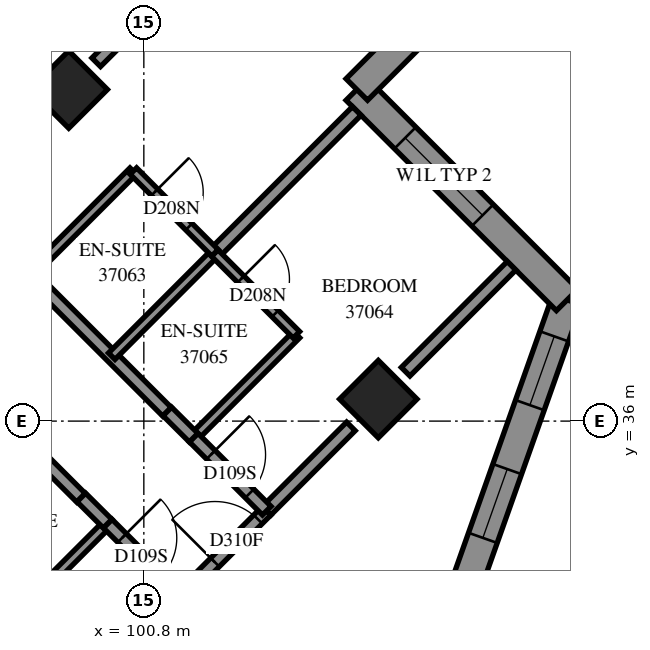
"""IFC4 building model, lengths in metres.
Left out: names, types, materials, properties, quantities, classifications, styles, units other than length and angle.
Written with IfcOpenShell. Run it as: python <this file> out.ifc"""

import sys

from ifc_helpers import new_model, si_unit, direction, frame, frame_2d, origin, origin_2d, place, context, subcontext, project, spatial, polyline, rectangle, outline, extrude, element, fill, save


model = new_model("IFC4")
c1 = context("Model", 3, precision=1e-05, world=origin(), true_north=direction((0.0, 1.0)))
c2 = subcontext(c1, "Body", "Model", "MODEL_VIEW")
j1 = project(units=[si_unit("LENGTHUNIT", "METRE"), si_unit("PLANEANGLEUNIT", "RADIAN")], contexts=[c1])
p1 = place(None, origin())
s1 = spatial("IfcSite", under=j1, at=p1, CompositionType="ELEMENT")
p2 = place(p1, origin())
s2 = spatial("IfcBuilding", under=s1, at=p2, CompositionType="ELEMENT")
p3 = place(p2, frame((0.0, 0.0, 138.8)))
s3 = spatial("IfcBuildingStorey", under=s2, at=p3, CompositionType="ELEMENT", Elevation=138.8)
for number, where, z_axis, x_axis in (
    (1, (99.565, 41.453, 0.0), (0.0, 0.0, 1.0), (0.707, -0.707, 0.0)),
    (2, (104.656, 36.362, 0.0), (0.0, 0.0, 1.0), (0.707, -0.707, 0.0)),
):
    element("IfcColumn", number, at=place(p3, frame(where, z_axis=z_axis, x_axis=x_axis)), inside=s3, PredefinedType="COLUMN", context=c2, shape_type="SweptSolid", body=[
        extrude(rectangle(XDim=0.9, YDim=0.9, at=origin_2d()), origin(), (0.0, 0.0, 1.0), 3.1),
    ])
p4 = place(p3, frame((105.991, 32.994, 0.0), z_axis=(0.0, 0.0, 1.0), x_axis=(0.333866339, 0.9426204261, 0.0)))
e3 = element("IfcWall", 3, at=p4, inside=s3, PredefinedType="SOLIDWALL", context=c2, shape_type="SweptSolid", body=[
    extrude(outline(polyline([(-0.114, -0.25), (5.461, -0.25), (5.146, 0.25), (0.114, 0.25), (-0.114, -0.25)])), origin(), (0.0, 0.0, 1.0), 3.1),
])
p5 = place(p4, frame((1.151, 0.0, 0.45)))
e4 = element("IfcOpeningElement", 4, at=p5, cuts=e3, PredefinedType="OPENING", context=c2, shape_type="SweptSolid", body=[
    extrude(rectangle(XDim=1.2, YDim=2.5, at=frame_2d((0.6, 1.25))), frame((0.0, 0.26, 0.0), z_axis=(0.0, -1.0, 0.0), x_axis=(1.0, 0.0, 0.0)), (0.0, 0.0, 1.0), 0.52),
])
p6 = place(p4, frame((3.467, 0.0, 0.45)))
e5 = element("IfcOpeningElement", 5, at=p6, cuts=e3, PredefinedType="OPENING", context=c2, shape_type="SweptSolid", body=[
    extrude(rectangle(XDim=1.2, YDim=2.5, at=frame_2d((0.6, 1.25))), frame((0.0, 0.26, 0.0), z_axis=(0.0, -1.0, 0.0), x_axis=(1.0, 0.0, 0.0)), (0.0, 0.0, 1.0), 0.52),
])
p7 = place(p3, frame((107.762, 37.994, 0.0), z_axis=(0.0, 0.0, 1.0), x_axis=(-0.707127221, 0.7070863407, 0.0)))
e6 = element("IfcWall", 6, at=p7, inside=s3, PredefinedType="SOLIDWALL", context=c2, shape_type="SweptSolid", body=[
    extrude(outline(polyline([(-0.158, -0.25), (4.642, -0.25), (5.142, 0.25), (0.158, 0.25), (-0.158, -0.25)])), origin(), (0.0, 0.0, 1.0), 3.1),
])
p8 = place(p7, frame((1.967, 0.0, 0.6)))
e7 = element("IfcOpeningElement", 7, at=p8, cuts=e6, PredefinedType="OPENING", context=c2, shape_type="SweptSolid", body=[
    extrude(rectangle(XDim=1.8, YDim=1.9, at=frame_2d((0.9, 0.95))), frame((0.0, 0.26, 0.0), z_axis=(0.0, -1.0, 0.0), x_axis=(1.0, 0.0, 0.0)), (0.0, 0.0, 1.0), 0.52),
])
p9 = place(p3, frame((104.302, 41.453, 0.0), z_axis=(0.0, 0.0, 1.0), x_axis=(0.7071156278, 0.7070979344, 0.0)))
e8 = element("IfcWall", 8, at=p9, inside=s3, PredefinedType="SOLIDWALL", context=c2, shape_type="SweptSolid", body=[
    extrude(outline(polyline([(0.25, -0.25), (5.98, -0.25), (5.324, 0.25), (-0.25, 0.25), (0.25, -0.25)])), origin(), (0.0, 0.0, 1.0), 3.1),
])
p10 = place(p9, frame((1.125, 0.0, 0.6)))
e9 = element("IfcOpeningElement", 9, at=p10, cuts=e8, PredefinedType="OPENING", context=c2, shape_type="SweptSolid", body=[
    extrude(rectangle(XDim=1.8, YDim=1.9, at=frame_2d((0.9, 0.95))), frame((0.0, 0.26, 0.0), z_axis=(0.0, -1.0, 0.0), x_axis=(1.0, 0.0, 0.0)), (0.0, 0.0, 1.0), 0.52),
])
p11 = place(p3, frame((93.127, 41.379, 0.0), z_axis=(0.0, 0.0, 1.0), x_axis=(0.7071067812, -0.7071067812, 0.0)))
e10 = element("IfcWall", 10, at=p11, inside=s3, PredefinedType="PARTITIONING", context=c2, shape_type="SweptSolid", body=[
    extrude(rectangle(XDim=9.39, YDim=0.2, at=frame_2d((4.695, 0.0))), origin(), (0.0, 0.0, 1.0), 3.1),
])
p12 = place(p11, frame((3.2, 0.0, 0.0)))
e11 = element("IfcOpeningElement", 11, at=p12, cuts=e10, PredefinedType="OPENING", context=c2, shape_type="SweptSolid", body=[
    extrude(rectangle(XDim=0.9, YDim=2.1, at=frame_2d((0.45, 1.05))), frame((0.0, 0.11, 0.0), z_axis=(0.0, -1.0, 0.0), x_axis=(1.0, 0.0, 0.0)), (0.0, 0.0, 1.0), 0.22),
])
p13 = place(p3, frame((95.177, 42.157, 0.0), z_axis=(0.0, 0.0, 1.0), x_axis=(0.7071067812, -0.7071067812, 0.0)))
e12 = element("IfcWall", 12, at=p13, inside=s3, PredefinedType="PARTITIONING", context=c2, shape_type="SweptSolid", body=[
    extrude(rectangle(XDim=8.491, YDim=0.2, at=frame_2d((4.245, 0.0))), origin(), (0.0, 0.0, 1.0), 3.1),
])
p14 = place(p13, frame((2.3, 0.0, 0.0)))
e13 = element("IfcOpeningElement", 13, at=p14, cuts=e12, PredefinedType="OPENING", context=c2, shape_type="SweptSolid", body=[
    extrude(rectangle(XDim=0.9, YDim=2.1, at=frame_2d((0.45, 1.05))), frame((0.0, 0.11, 0.0), z_axis=(0.0, -1.0, 0.0), x_axis=(1.0, 0.0, 0.0)), (0.0, 0.0, 1.0), 0.22),
])
p15 = place(p13, frame((3.95, 0.0, 0.0)))
e14 = element("IfcOpeningElement", 14, at=p15, cuts=e12, PredefinedType="OPENING", context=c2, shape_type="SweptSolid", body=[
    extrude(rectangle(XDim=0.9, YDim=2.1, at=frame_2d((0.45, 1.05))), frame((0.0, 0.11, 0.0), z_axis=(0.0, -1.0, 0.0), x_axis=(1.0, 0.0, 0.0)), (0.0, 0.0, 1.0), 0.22),
])
p16 = place(p3, frame((100.017, 41.901, 0.0), z_axis=(0.0, 0.0, 1.0), x_axis=(0.7072754814, 0.7069380408, 0.0)))
e15 = element("IfcWall", 15, at=p16, inside=s3, PredefinedType="PARTITIONING", context=c2, shape_type="SweptSolid", body=[
    extrude(rectangle(XDim=5.927, YDim=0.2, at=frame_2d((2.963, 0.0))), origin(), (0.0, 0.0, 1.0), 3.1),
])
p17 = place(p3, frame((101.968, 38.766, 0.0), z_axis=(0.0, 0.0, 1.0), x_axis=(0.7071067812, 0.7071067812, 0.0)))
e16 = element("IfcWall", 16, at=p17, inside=s3, PredefinedType="PARTITIONING", context=c2, shape_type="SweptSolid", body=[
    extrude(rectangle(XDim=3.3, YDim=0.2, at=frame_2d((1.65, 0.0))), origin(), (0.0, 0.0, 1.0), 3.1),
])
p18 = place(p3, frame((105.105, 36.813, 0.0), z_axis=(0.0, 0.0, 1.0), x_axis=(0.7071067812, 0.7071067812, 0.0)))
e17 = element("IfcWall", 17, at=p18, inside=s3, PredefinedType="PARTITIONING", context=c2, shape_type="SweptSolid", body=[
    extrude(rectangle(XDim=2.463, YDim=0.2, at=frame_2d((1.232, 0.0))), origin(), (0.0, 0.0, 1.0), 3.1),
])
for number, where, z_axis, x_axis in (
    (18, (98.927, 38.413, 0.0), (0.0, 0.0, 1.0), (0.707, 0.707, 0.0)),
    (19, (98.503, 32.615, 0.0), (0.0, 0.0, 1.0), (0.707, 0.707, 0.0)),
):
    element("IfcWall", number, at=place(p3, frame(where, z_axis=z_axis, x_axis=x_axis)), inside=s3, PredefinedType="PARTITIONING", context=c2, shape_type="SweptSolid", body=[
        extrude(rectangle(XDim=2.401, YDim=0.15, at=frame_2d((1.201, 0.0))), origin(), (0.0, 0.0, 1.0), 3.1),
    ])
p19 = place(p3, frame((100.273, 37.067, 0.0), z_axis=(0.0, 0.0, 1.0), x_axis=(0.706689978, 0.7075233388, 0.0)))
e20 = element("IfcWall", 20, at=p19, inside=s3, PredefinedType="PARTITIONING", context=c2, shape_type="SweptSolid", body=[
    extrude(rectangle(XDim=2.4, YDim=0.15, at=frame_2d((1.2, 0.0))), origin(), (0.0, 0.0, 1.0), 3.1),
])
p20 = place(p3, frame((101.615, 35.727, 0.0), z_axis=(0.0, 0.0, 1.0), x_axis=(0.7071067812, 0.7071067812, 0.0)))
e21 = element("IfcWall", 21, at=p20, inside=s3, PredefinedType="PARTITIONING", context=c2, shape_type="SweptSolid", body=[
    extrude(rectangle(XDim=2.398, YDim=0.15, at=frame_2d((1.199, 0.0))), origin(), (0.0, 0.0, 1.0), 3.1),
])
p21 = place(p3, frame((101.403, 33.111, 0.0), z_axis=(0.0, 0.0, 1.0), x_axis=(0.7071067812, 0.7071067812, 0.0)))
e22 = element("IfcWall", 22, at=p21, inside=s3, PredefinedType="PARTITIONING", context=c2, shape_type="SweptSolid", body=[
    extrude(rectangle(XDim=2.0, YDim=0.2, at=frame_2d((1.0, 0.0))), origin(), (0.0, 0.0, 1.0), 2.6),
])
p22 = place(p21, frame((0.802, 0.0, 0.0)))
e23 = element("IfcOpeningElement", 23, at=p22, cuts=e22, PredefinedType="OPENING", context=c2, shape_type="SweptSolid", body=[
    extrude(rectangle(XDim=1.0, YDim=2.1, at=frame_2d((0.5, 1.05))), frame((0.0, 0.11, 0.0), z_axis=(0.0, -1.0, 0.0), x_axis=(1.0, 0.0, 0.0)), (0.0, 0.0, 1.0), 0.22),
])
p23 = place(p3, frame((102.817, 34.525, 0.0), z_axis=(0.0, 0.0, 1.0), x_axis=(0.7071067812, 0.7071067812, 0.0)))
e24 = element("IfcWall", 24, at=p23, inside=s3, PredefinedType="PARTITIONING", context=c2, shape_type="SweptSolid", body=[
    extrude(rectangle(XDim=1.963, YDim=0.2, at=frame_2d((0.982, 0.0))), origin(), (0.0, 0.0, 1.0), 2.6),
])
p24 = place(p3, frame((101.965, 38.763, 0.0), z_axis=(0.0, 0.0, 1.0), x_axis=(0.7071067812, -0.7071067812, 0.0)))
e25 = element("IfcWall", 25, at=p24, inside=s3, PredefinedType="PARTITIONING", context=c2, shape_type="SweptSolid", body=[
    extrude(rectangle(XDim=1.901, YDim=0.15, at=frame_2d((0.95, 0.0))), origin(), (0.0, 0.0, 1.0), 3.1),
])
p25 = place(p24, frame((0.608, 0.0, 0.0)))
e26 = element("IfcOpeningElement", 26, at=p25, cuts=e25, PredefinedType="OPENING", context=c2, shape_type="SweptSolid", body=[
    extrude(rectangle(XDim=0.8, YDim=2.1, at=frame_2d((0.4, 1.05))), frame((0.0, 0.085, 0.0), z_axis=(0.0, -1.0, 0.0), x_axis=(1.0, 0.0, 0.0)), (0.0, 0.0, 1.0), 0.17),
])
p26 = place(p3, frame((100.628, 40.112, 0.0), z_axis=(0.0, 0.0, 1.0), x_axis=(0.7065800724, -0.7076330979, 0.0)))
e27 = element("IfcWall", 27, at=p26, inside=s3, PredefinedType="PARTITIONING", context=c2, shape_type="SweptSolid", body=[
    extrude(rectangle(XDim=1.899, YDim=0.15, at=frame_2d((0.95, 0.0))), origin(), (0.0, 0.0, 1.0), 3.1),
])
p27 = place(p26, frame((0.493, 0.0, 0.0)))
e28 = element("IfcOpeningElement", 28, at=p27, cuts=e27, PredefinedType="OPENING", context=c2, shape_type="SweptSolid", body=[
    extrude(rectangle(XDim=0.8, YDim=2.1, at=frame_2d((0.4, 1.05))), frame((0.0, 0.085, 0.0), z_axis=(0.0, -1.0, 0.0), x_axis=(1.0, 0.0, 0.0)), (0.0, 0.0, 1.0), 0.17),
])
p28 = place(p3, frame((100.205, 34.315, 0.0), z_axis=(0.0, 0.0, 1.0), x_axis=(0.7071067812, -0.7071067812, 0.0)))
e29 = element("IfcWall", 29, at=p28, inside=s3, PredefinedType="PARTITIONING", context=c2, shape_type="SweptSolid", body=[
    extrude(rectangle(XDim=1.7, YDim=0.2, at=frame_2d((0.85, 0.0))), origin(), (0.0, 0.0, 1.0), 3.1),
])
p29 = place(p28, frame((0.335, 0.0, 0.0)))
e30 = element("IfcOpeningElement", 30, at=p29, cuts=e29, PredefinedType="OPENING", context=c2, shape_type="SweptSolid", body=[
    extrude(rectangle(XDim=0.9, YDim=2.1, at=frame_2d((0.45, 1.05))), frame((0.0, 0.11, 0.0), z_axis=(0.0, -1.0, 0.0), x_axis=(1.0, 0.0, 0.0)), (0.0, 0.0, 1.0), 0.22),
])
p30 = place(p3, frame((101.619, 35.729, 0.0), z_axis=(0.0, 0.0, 1.0), x_axis=(0.7071067812, -0.7071067812, 0.0)))
e31 = element("IfcWall", 31, at=p30, inside=s3, PredefinedType="PARTITIONING", context=c2, shape_type="SweptSolid", body=[
    extrude(rectangle(XDim=1.7, YDim=0.2, at=frame_2d((0.85, 0.0))), origin(), (0.0, 0.0, 1.0), 3.1),
])
p31 = place(p30, frame((0.4, 0.0, 0.0)))
e32 = element("IfcOpeningElement", 32, at=p31, cuts=e31, PredefinedType="OPENING", context=c2, shape_type="SweptSolid", body=[
    extrude(rectangle(XDim=0.9, YDim=2.1, at=frame_2d((0.45, 1.05))), frame((0.0, 0.11, 0.0), z_axis=(0.0, -1.0, 0.0), x_axis=(1.0, 0.0, 0.0)), (0.0, 0.0, 1.0), 0.22),
])
for number, where, z_axis, x_axis in (
    (33, (101.186, 36.158, 0.0), (0.0, 0.0, 1.0), (0.709, -0.705, 0.0)),
    (34, (99.772, 34.744, 0.0), (0.0, 0.0, 1.0), (0.709, -0.705, 0.0)),
):
    element("IfcWall", number, at=place(p3, frame(where, z_axis=z_axis, x_axis=x_axis)), inside=s3, PredefinedType="PARTITIONING", context=c2, shape_type="SweptSolid", body=[
        extrude(rectangle(XDim=0.61, YDim=0.2, at=frame_2d((0.305, 0.0))), origin(), (0.0, 0.0, 1.0), 3.1),
    ])
p32 = place(p5, origin())
e35 = element("IfcWindow", 35, at=p32, inside=s3, PartitioningType="SINGLE_PANEL", PredefinedType="WINDOW", context=c2, shape_type="SweptSolid", body=[
    extrude(rectangle(XDim=1.2, YDim=2.5, at=frame_2d((0.6, 1.25))), frame((0.0, 0.18, 0.0), z_axis=(0.0, -1.0, 0.0), x_axis=(1.0, 0.0, 0.0)), (0.0, 0.0, 1.0), 0.06),
])
fill(e4, e35)
p33 = place(p6, origin())
e36 = element("IfcWindow", 36, at=p33, inside=s3, PartitioningType="SINGLE_PANEL", PredefinedType="WINDOW", context=c2, shape_type="SweptSolid", body=[
    extrude(rectangle(XDim=1.2, YDim=2.5, at=frame_2d((0.6, 1.25))), frame((0.0, 0.18, 0.0), z_axis=(0.0, -1.0, 0.0), x_axis=(1.0, 0.0, 0.0)), (0.0, 0.0, 1.0), 0.06),
])
fill(e5, e36)
p34 = place(p8, origin())
e37 = element("IfcWindow", 37, at=p34, inside=s3, PartitioningType="SINGLE_PANEL", PredefinedType="WINDOW", context=c2, shape_type="SweptSolid", body=[
    extrude(rectangle(XDim=1.8, YDim=1.9, at=frame_2d((0.9, 0.95))), frame((0.0, 0.18, 0.0), z_axis=(0.0, -1.0, 0.0), x_axis=(1.0, 0.0, 0.0)), (0.0, 0.0, 1.0), 0.06),
])
fill(e7, e37)
p35 = place(p27, origin())
e38 = element("IfcDoor", 38, at=p35, inside=s3, OperationType="SINGLE_SWING_RIGHT", PredefinedType="DOOR", context=c2, shape_type="SweptSolid", body=[
    extrude(rectangle(XDim=0.8, YDim=2.1, at=frame_2d((0.4, 1.05))), frame((0.0, 0.025, 0.0), z_axis=(0.0, -1.0, 0.0), x_axis=(1.0, 0.0, 0.0)), (0.0, 0.0, 1.0), 0.05),
])
fill(e28, e38)
p36 = place(p31, origin())
e39 = element("IfcDoor", 39, at=p36, inside=s3, OperationType="SINGLE_SWING_RIGHT", PredefinedType="DOOR", context=c2, shape_type="SweptSolid", body=[
    extrude(rectangle(XDim=0.9, YDim=2.1, at=frame_2d((0.45, 1.05))), frame((0.0, 0.025, 0.0), z_axis=(0.0, -1.0, 0.0), x_axis=(1.0, 0.0, 0.0)), (0.0, 0.0, 1.0), 0.05),
])
fill(e32, e39)
p37 = place(p25, origin())
e40 = element("IfcDoor", 40, at=p37, inside=s3, OperationType="SINGLE_SWING_RIGHT", PredefinedType="DOOR", context=c2, shape_type="SweptSolid", body=[
    extrude(rectangle(XDim=0.8, YDim=2.1, at=frame_2d((0.4, 1.05))), frame((0.0, 0.025, 0.0), z_axis=(0.0, -1.0, 0.0), x_axis=(1.0, 0.0, 0.0)), (0.0, 0.0, 1.0), 0.05),
])
fill(e26, e40)
p38 = place(p29, origin())
e41 = element("IfcDoor", 41, at=p38, inside=s3, OperationType="SINGLE_SWING_LEFT", PredefinedType="DOOR", context=c2, shape_type="SweptSolid", body=[
    extrude(rectangle(XDim=0.9, YDim=2.1, at=frame_2d((0.45, 1.05))), frame((0.0, 0.025, 0.0), z_axis=(0.0, -1.0, 0.0), x_axis=(1.0, 0.0, 0.0)), (0.0, 0.0, 1.0), 0.05),
])
fill(e30, e41)
p39 = place(p22, origin())
e42 = element("IfcDoor", 42, at=p39, inside=s3, OperationType="SINGLE_SWING_RIGHT", PredefinedType="DOOR", context=c2, shape_type="SweptSolid", body=[
    extrude(rectangle(XDim=1.0, YDim=2.1, at=frame_2d((0.5, 1.05))), frame((0.0, 0.025, 0.0), z_axis=(0.0, -1.0, 0.0), x_axis=(1.0, 0.0, 0.0)), (0.0, 0.0, 1.0), 0.05),
])
fill(e23, e42)
save(model, sys.argv[1])
